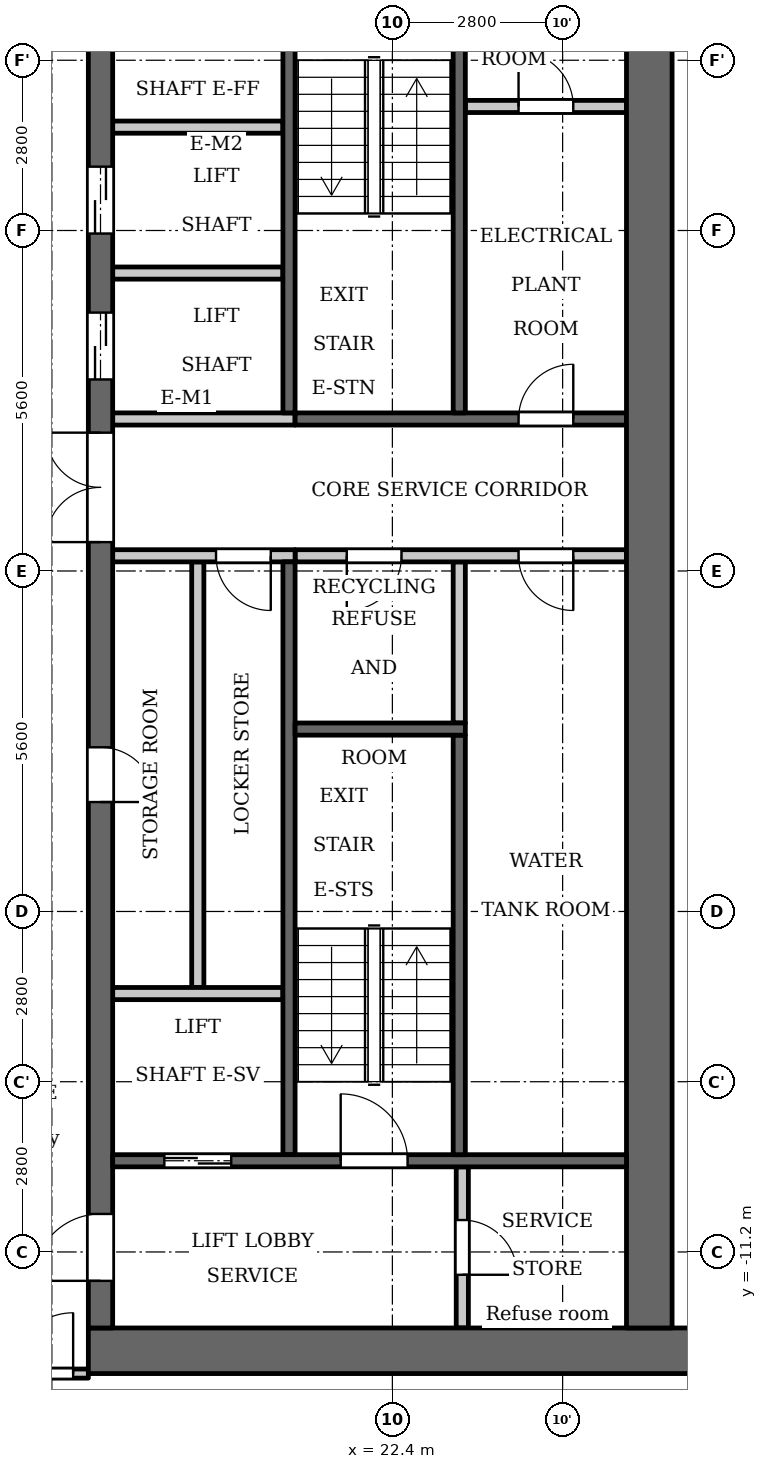
"""IFC4 building model, lengths in metres.
Left out: names, types, materials, properties, quantities, classifications, styles, units other than length and angle.
Written with IfcOpenShell. Run it as: python <this file> out.ifc"""

import sys

from ifc_helpers import new_model, si_unit, direction, frame, frame_2d, origin, place, context, subcontext, project, spatial, rectangle, extrude, element, fill, save


model = new_model("IFC4")
c1 = context("Model", 3, precision=1e-05, world=origin(), true_north=direction((0.0, 1.0)))
c2 = subcontext(c1, "Body", "Model", "MODEL_VIEW")
j1 = project(units=[si_unit("LENGTHUNIT", "METRE"), si_unit("PLANEANGLEUNIT", "RADIAN")], contexts=[c1])
p1 = place(None, origin())
s1 = spatial("IfcSite", under=j1, at=p1, CompositionType="ELEMENT")
p2 = place(p1, origin())
s2 = spatial("IfcBuilding", under=s1, at=p2, CompositionType="ELEMENT")
p3 = place(p2, frame((0.0, 0.0, 143.1)))
s3 = spatial("IfcBuildingStorey", under=s2, at=p3, CompositionType="ELEMENT", Elevation=143.1)
p4 = place(p3, frame((23.5, -2.5, 0.0), z_axis=(0.0, 0.0, 1.0), x_axis=(0.0, 1.0, 0.0)))
e1 = element("IfcWall", 1, at=p4, inside=s3, PredefinedType="PARTITIONING", context=c2, shape_type="SweptSolid", body=[
    extrude(rectangle(XDim=2.65, YDim=0.2, at=frame_2d((1.325, 0.0))), origin(), (0.0, 0.0, 1.0), 3.2),
])
p5 = place(p3, frame((20.7, 2.6, 0.0), z_axis=(0.0, 0.0, 1.0), x_axis=(0.0, 1.0, 0.0)))
e2 = element("IfcWall", 2, at=p5, inside=s3, PredefinedType="SHEAR", context=c2, shape_type="SweptSolid", body=[
    extrude(rectangle(XDim=7.0, YDim=0.2, at=frame_2d((3.5, 0.0))), origin(), (0.0, 0.0, 1.0), 3.2),
])
p6 = place(p3, frame((20.7, -9.6, 0.0), z_axis=(0.0, 0.0, 1.0), x_axis=(0.0, 1.0, 0.0)))
e3 = element("IfcWall", 3, at=p6, inside=s3, PredefinedType="SHEAR", context=c2, shape_type="SweptSolid", body=[
    extrude(rectangle(XDim=9.75, YDim=0.2, at=frame_2d((4.875, 0.0))), origin(), (0.0, 0.0, 1.0), 3.2),
])
p7 = place(p3, frame((20.8, 2.5, 0.0), z_axis=(0.0, 0.0, 1.0), x_axis=(1.0, 0.0, 0.0)))
e4 = element("IfcWall", 4, at=p7, inside=s3, PredefinedType="SHEAR", context=c2, shape_type="SweptSolid", body=[
    extrude(rectangle(XDim=5.45, YDim=0.2, at=frame_2d((2.725, 0.0))), origin(), (0.0, 0.0, 1.0), 3.2),
])
p8 = place(p7, frame((3.675, 0.0, 0.0)))
e5 = element("IfcOpeningElement", 5, at=p8, cuts=e4, PredefinedType="OPENING", context=c2, shape_type="SweptSolid", body=[
    extrude(rectangle(XDim=0.9, YDim=2.1, at=frame_2d((0.45, 1.05))), frame((0.0, 0.11, 0.0), z_axis=(0.0, -1.0, 0.0), x_axis=(1.0, 0.0, 0.0)), (0.0, 0.0, 1.0), 0.22),
])
p9 = place(p3, frame((20.8, 0.25, 0.0), z_axis=(0.0, 0.0, 1.0), x_axis=(1.0, 0.0, 0.0)))
e6 = element("IfcWall", 6, at=p9, inside=s3, PredefinedType="PARTITIONING", context=c2, shape_type="SweptSolid", body=[
    extrude(rectangle(XDim=5.45, YDim=0.2, at=frame_2d((2.725, 0.0))), origin(), (0.0, 0.0, 1.0), 3.2),
])
p10 = place(p9, frame((0.85, 0.0, 0.0)))
e7 = element("IfcOpeningElement", 7, at=p10, cuts=e6, PredefinedType="OPENING", context=c2, shape_type="SweptSolid", body=[
    extrude(rectangle(XDim=0.9, YDim=2.1, at=frame_2d((0.45, 1.05))), frame((0.0, 0.11, 0.0), z_axis=(0.0, -1.0, 0.0), x_axis=(1.0, 0.0, 0.0)), (0.0, 0.0, 1.0), 0.22),
])
p11 = place(p9, frame((3.675, 0.0, 0.0)))
e8 = element("IfcOpeningElement", 8, at=p11, cuts=e6, PredefinedType="OPENING", context=c2, shape_type="SweptSolid", body=[
    extrude(rectangle(XDim=0.9, YDim=2.1, at=frame_2d((0.45, 1.05))), frame((0.0, 0.11, 0.0), z_axis=(0.0, -1.0, 0.0), x_axis=(1.0, 0.0, 0.0)), (0.0, 0.0, 1.0), 0.22),
])
p12 = place(p3, frame((17.4, -12.825, 0.0), z_axis=(0.0, 0.0, 1.0), x_axis=(1.0, 0.0, 0.0)))
e9 = element("IfcWall", 9, at=p12, inside=s3, PredefinedType="SHEAR", context=c2, shape_type="SweptSolid", body=[
    extrude(rectangle(XDim=10.4, YDim=0.75, at=frame_2d((5.2, 0.0))), origin(), (0.0, 0.0, 1.0), 3.2),
])
p13 = place(p3, frame((19.2, -6.85, 0.0), z_axis=(0.0, 0.0, 1.0), x_axis=(0.0, 1.0, 0.0)))
e10 = element("IfcWall", 10, at=p13, inside=s3, PredefinedType="PARTITIONING", context=c2, shape_type="SweptSolid", body=[
    extrude(rectangle(XDim=7.0, YDim=0.2, at=frame_2d((3.5, 0.0))), origin(), (0.0, 0.0, 1.0), 3.2),
])
p14 = place(p3, frame((17.6, -12.45, 0.0), z_axis=(0.0, 0.0, 1.0), x_axis=(0.0, 1.0, 0.0)))
e11 = element("IfcWall", 11, at=p14, inside=s3, PredefinedType="SHEAR", context=c2, shape_type="SweptSolid", body=[
    extrude(rectangle(XDim=24.9, YDim=0.4, at=frame_2d((12.45, 0.0))), origin(), (0.0, 0.0, 1.0), 3.2),
])
p15 = place(p14, frame((8.65, 0.0, 0.0)))
e12 = element("IfcOpeningElement", 12, at=p15, cuts=e11, PredefinedType="OPENING", context=c2, shape_type="SweptSolid", body=[
    extrude(rectangle(XDim=0.9, YDim=2.1, at=frame_2d((0.45, 1.05))), frame((0.0, 0.21, 0.0), z_axis=(0.0, -1.0, 0.0), x_axis=(1.0, 0.0, 0.0)), (0.0, 0.0, 1.0), 0.42),
])
p16 = place(p14, frame((15.6, 0.0, 0.0)))
e13 = element("IfcOpeningElement", 13, at=p16, cuts=e11, PredefinedType="OPENING", context=c2, shape_type="SweptSolid", body=[
    extrude(rectangle(XDim=1.1, YDim=2.1, at=frame_2d((0.55, 1.05))), frame((0.0, 0.21, 0.0), z_axis=(0.0, -1.0, 0.0), x_axis=(1.0, 0.0, 0.0)), (0.0, 0.0, 1.0), 0.42),
])
p17 = place(p14, frame((18.0, 0.0, 0.0)))
e14 = element("IfcOpeningElement", 14, at=p17, cuts=e11, PredefinedType="OPENING", context=c2, shape_type="SweptSolid", body=[
    extrude(rectangle(XDim=1.1, YDim=2.1, at=frame_2d((0.55, 1.05))), frame((0.0, 0.21, 0.0), z_axis=(0.0, -1.0, 0.0), x_axis=(1.0, 0.0, 0.0)), (0.0, 0.0, 1.0), 0.42),
])
p18 = place(p14, frame((23.025, 0.0, 0.0)))
e15 = element("IfcOpeningElement", 15, at=p18, cuts=e11, PredefinedType="OPENING", context=c2, shape_type="SweptSolid", body=[
    extrude(rectangle(XDim=1.1, YDim=2.1, at=frame_2d((0.55, 1.05))), frame((0.0, 0.21, 0.0), z_axis=(0.0, -1.0, 0.0), x_axis=(1.0, 0.0, 0.0)), (0.0, 0.0, 1.0), 0.42),
])
p19 = place(p14, frame((0.775, 0.0, 0.0)))
e16 = element("IfcOpeningElement", 16, at=p19, cuts=e11, PredefinedType="OPENING", context=c2, shape_type="SweptSolid", body=[
    extrude(rectangle(XDim=1.1, YDim=2.1, at=frame_2d((0.55, 1.05))), frame((0.0, 0.21, 0.0), z_axis=(0.0, -1.0, 0.0), x_axis=(1.0, 0.0, 0.0)), (0.0, 0.0, 1.0), 0.42),
])
p20 = place(p14, frame((12.925, 0.0, 0.0)))
e17 = element("IfcOpeningElement", 17, at=p20, cuts=e11, PredefinedType="OPENING", context=c2, shape_type="SweptSolid", body=[
    extrude(rectangle(XDim=1.8, YDim=2.1, at=frame_2d((0.9, 1.05))), frame((0.0, 0.21, 0.0), z_axis=(0.0, -1.0, 0.0), x_axis=(1.0, 0.0, 0.0)), (0.0, 0.0, 1.0), 0.42),
])
p21 = place(p3, frame((26.625, -12.45, 0.0), z_axis=(0.0, 0.0, 1.0), x_axis=(0.0, 1.0, 0.0)))
e18 = element("IfcWall", 18, at=p21, inside=s3, PredefinedType="SHEAR", context=c2, shape_type="SweptSolid", body=[
    extrude(rectangle(XDim=24.9, YDim=0.75, at=frame_2d((12.45, 0.0))), origin(), (0.0, 0.0, 1.0), 3.2),
])
p22 = place(p3, frame((23.55, -12.45, 0.0), z_axis=(0.0, 0.0, 1.0), x_axis=(0.0, 1.0, 0.0)))
e19 = element("IfcWall", 19, at=p22, inside=s3, PredefinedType="PARTITIONING", context=c2, shape_type="SweptSolid", body=[
    extrude(rectangle(XDim=2.65, YDim=0.2, at=frame_2d((1.325, 0.0))), origin(), (0.0, 0.0, 1.0), 3.2),
])
p23 = place(p22, frame((0.875, 0.0, 0.0)))
e20 = element("IfcOpeningElement", 20, at=p23, cuts=e19, PredefinedType="OPENING", context=c2, shape_type="SweptSolid", body=[
    extrude(rectangle(XDim=0.9, YDim=2.1, at=frame_2d((0.45, 1.05))), frame((0.0, 0.11, 0.0), z_axis=(0.0, -1.0, 0.0), x_axis=(1.0, 0.0, 0.0)), (0.0, 0.0, 1.0), 0.22),
])
p24 = place(p3, frame((23.6, 7.64, 0.0), z_axis=(0.0, 0.0, 1.0), x_axis=(1.0, 0.0, 0.0)))
e21 = element("IfcWall", 21, at=p24, inside=s3, PredefinedType="PARTITIONING", context=c2, shape_type="SweptSolid", body=[
    extrude(rectangle(XDim=2.65, YDim=0.2, at=frame_2d((1.325, 0.0))), origin(), (0.0, 0.0, 1.0), 3.2),
])
p25 = place(p24, frame((0.875, 0.0, 0.0)))
e22 = element("IfcOpeningElement", 22, at=p25, cuts=e21, PredefinedType="OPENING", context=c2, shape_type="SweptSolid", body=[
    extrude(rectangle(XDim=0.9, YDim=2.1, at=frame_2d((0.45, 1.05))), frame((0.0, 0.11, 0.0), z_axis=(0.0, -1.0, 0.0), x_axis=(1.0, 0.0, 0.0)), (0.0, 0.0, 1.0), 0.22),
])
p26 = place(p3, frame((17.8, -9.7, 0.0), z_axis=(0.0, 0.0, 1.0), x_axis=(1.0, 0.0, 0.0)))
e23 = element("IfcWall", 23, at=p26, inside=s3, PredefinedType="SHEAR", context=c2, shape_type="SweptSolid", body=[
    extrude(rectangle(XDim=8.45, YDim=0.2, at=frame_2d((4.225, 0.0))), origin(), (0.0, 0.0, 1.0), 3.2),
])
p27 = place(p26, frame((0.85, 0.0, 0.0)))
e24 = element("IfcOpeningElement", 24, at=p27, cuts=e23, PredefinedType="OPENING", context=c2, shape_type="SweptSolid", body=[
    extrude(rectangle(XDim=1.1, YDim=2.1, at=frame_2d((0.55, 1.05))), frame((0.0, 0.11, 0.0), z_axis=(0.0, -1.0, 0.0), x_axis=(1.0, 0.0, 0.0)), (0.0, 0.0, 1.0), 0.22),
])
p28 = place(p26, frame((3.75, 0.0, 0.0)))
e25 = element("IfcOpeningElement", 25, at=p28, cuts=e23, PredefinedType="OPENING", context=c2, shape_type="SweptSolid", body=[
    extrude(rectangle(XDim=1.1, YDim=2.1, at=frame_2d((0.55, 1.05))), frame((0.0, 0.11, 0.0), z_axis=(0.0, -1.0, 0.0), x_axis=(1.0, 0.0, 0.0)), (0.0, 0.0, 1.0), 0.22),
])
p29 = place(p3, frame((17.8, -6.95, 0.0), z_axis=(0.0, 0.0, 1.0), x_axis=(1.0, 0.0, 0.0)))
e26 = element("IfcWall", 26, at=p29, inside=s3, PredefinedType="PARTITIONING", context=c2, shape_type="SweptSolid", body=[
    extrude(rectangle(XDim=2.8, YDim=0.2, at=frame_2d((1.4, 0.0))), origin(), (0.0, 0.0, 1.0), 3.2),
])
p30 = place(p3, frame((17.8, 0.25, 0.0), z_axis=(0.0, 0.0, 1.0), x_axis=(1.0, 0.0, 0.0)))
e27 = element("IfcWall", 27, at=p30, inside=s3, PredefinedType="PARTITIONING", context=c2, shape_type="SweptSolid", body=[
    extrude(rectangle(XDim=3.0, YDim=0.2, at=frame_2d((1.5, 0.0))), origin(), (0.0, 0.0, 1.0), 3.2),
])
p31 = place(p30, frame((1.7, 0.0, 0.0)))
e28 = element("IfcOpeningElement", 28, at=p31, cuts=e27, PredefinedType="OPENING", context=c2, shape_type="SweptSolid", body=[
    extrude(rectangle(XDim=0.9, YDim=2.1, at=frame_2d((0.45, 1.05))), frame((0.0, 0.11, 0.0), z_axis=(0.0, -1.0, 0.0), x_axis=(1.0, 0.0, 0.0)), (0.0, 0.0, 1.0), 0.22),
])
p32 = place(p3, frame((17.8, 2.5, 0.0), z_axis=(0.0, 0.0, 1.0), x_axis=(1.0, 0.0, 0.0)))
e29 = element("IfcWall", 29, at=p32, inside=s3, PredefinedType="PARTITIONING", context=c2, shape_type="SweptSolid", body=[
    extrude(rectangle(XDim=3.0, YDim=0.2, at=frame_2d((1.5, 0.0))), origin(), (0.0, 0.0, 1.0), 3.2),
])
for number, where, z_axis, x_axis in (
    (30, (17.8, 4.9, 0.0), (0.0, 0.0, 1.0), (1.0, 0.0, 0.0)),
    (31, (17.8, 7.3, 0.0), (0.0, 0.0, 1.0), (1.0, 0.0, 0.0)),
):
    element("IfcWall", number, at=place(p3, frame(where, z_axis=z_axis, x_axis=x_axis)), inside=s3, PredefinedType="PARTITIONING", context=c2, shape_type="SweptSolid", body=[
        extrude(rectangle(XDim=2.8, YDim=0.2, at=frame_2d((1.4, 0.0))), origin(), (0.0, 0.0, 1.0), 3.2),
    ])
p33 = place(p3, frame((23.5, 2.6, 0.0), z_axis=(0.0, 0.0, 1.0), x_axis=(0.0, 1.0, 0.0)))
e32 = element("IfcWall", 32, at=p33, inside=s3, PredefinedType="SHEAR", context=c2, shape_type="SweptSolid", body=[
    extrude(rectangle(XDim=7.0, YDim=0.2, at=frame_2d((3.5, 0.0))), origin(), (0.0, 0.0, 1.0), 3.2),
])
p34 = place(p3, frame((23.5, -9.6, 0.0), z_axis=(0.0, 0.0, 1.0), x_axis=(0.0, 1.0, 0.0)))
e33 = element("IfcWall", 33, at=p34, inside=s3, PredefinedType="SHEAR", context=c2, shape_type="SweptSolid", body=[
    extrude(rectangle(XDim=6.9, YDim=0.2, at=frame_2d((3.45, 0.0))), origin(), (0.0, 0.0, 1.0), 3.2),
])
p35 = place(p3, frame((20.8, -2.6, 0.0), z_axis=(0.0, 0.0, 1.0), x_axis=(1.0, 0.0, 0.0)))
e34 = element("IfcWall", 34, at=p35, inside=s3, PredefinedType="SHEAR", context=c2, shape_type="SweptSolid", body=[
    extrude(rectangle(XDim=2.8, YDim=0.2, at=frame_2d((1.4, 0.0))), origin(), (0.0, 0.0, 1.0), 3.2),
])
p36 = place(p3, frame((-17.4, -13.2, 0.0), z_axis=(0.0, 0.0, 1.0), x_axis=(1.0, 0.0, 0.0)))
e35 = element("IfcWall", 35, at=p36, inside=s3, PredefinedType="PARTITIONING", context=c2, shape_type="SweptSolid", body=[
    extrude(rectangle(XDim=34.8, YDim=0.15, at=frame_2d((17.4, 0.0))), origin(), (0.0, 0.0, 1.0), 3.2),
])
p37 = place(p36, frame((0.15, 0.0, 0.0)))
e36 = element("IfcOpeningElement", 36, at=p37, cuts=e35, PredefinedType="OPENING", context=c2, shape_type="SweptSolid", body=[
    extrude(rectangle(XDim=1.0, YDim=2.1, at=frame_2d((0.5, 1.05))), frame((0.0, 0.085, 0.0), z_axis=(0.0, -1.0, 0.0), x_axis=(1.0, 0.0, 0.0)), (0.0, 0.0, 1.0), 0.17),
])
p38 = place(p36, frame((33.55, 0.0, 0.0)))
e37 = element("IfcOpeningElement", 37, at=p38, cuts=e35, PredefinedType="OPENING", context=c2, shape_type="SweptSolid", body=[
    extrude(rectangle(XDim=1.0, YDim=2.1, at=frame_2d((0.5, 1.05))), frame((0.0, 0.085, 0.0), z_axis=(0.0, -1.0, 0.0), x_axis=(1.0, 0.0, 0.0)), (0.0, 0.0, 1.0), 0.17),
])
p39 = place(p36, frame((6.85, 0.0, 0.0)))
e38 = element("IfcOpeningElement", 38, at=p39, cuts=e35, PredefinedType="OPENING", context=c2, shape_type="SweptSolid", body=[
    extrude(rectangle(XDim=1.0, YDim=2.1, at=frame_2d((0.5, 1.05))), frame((0.0, 0.085, 0.0), z_axis=(0.0, -1.0, 0.0), x_axis=(1.0, 0.0, 0.0)), (0.0, 0.0, 1.0), 0.17),
])
p40 = place(p36, frame((12.45, 0.0, 0.0)))
e39 = element("IfcOpeningElement", 39, at=p40, cuts=e35, PredefinedType="OPENING", context=c2, shape_type="SweptSolid", body=[
    extrude(rectangle(XDim=1.0, YDim=2.1, at=frame_2d((0.5, 1.05))), frame((0.0, 0.085, 0.0), z_axis=(0.0, -1.0, 0.0), x_axis=(1.0, 0.0, 0.0)), (0.0, 0.0, 1.0), 0.17),
])
p41 = place(p36, frame((21.3, 0.0, 0.0)))
e40 = element("IfcOpeningElement", 40, at=p41, cuts=e35, PredefinedType="OPENING", context=c2, shape_type="SweptSolid", body=[
    extrude(rectangle(XDim=1.0, YDim=2.1, at=frame_2d((0.5, 1.05))), frame((0.0, 0.085, 0.0), z_axis=(0.0, -1.0, 0.0), x_axis=(1.0, 0.0, 0.0)), (0.0, 0.0, 1.0), 0.17),
])
p42 = place(p36, frame((26.9, 0.0, 0.0)))
e41 = element("IfcOpeningElement", 41, at=p42, cuts=e35, PredefinedType="OPENING", context=c2, shape_type="SweptSolid", body=[
    extrude(rectangle(XDim=1.0, YDim=2.1, at=frame_2d((0.5, 1.05))), frame((0.0, 0.085, 0.0), z_axis=(0.0, -1.0, 0.0), x_axis=(1.0, 0.0, 0.0)), (0.0, 0.0, 1.0), 0.17),
])
p43 = place(p27, origin())
e42 = element("IfcDoor", 42, at=p43, inside=s3, OperationType="DOUBLE_DOOR_SLIDING", PredefinedType="DOOR", context=c2, shape_type="SweptSolid", body=[
    extrude(rectangle(XDim=1.1, YDim=2.1, at=frame_2d((0.55, 1.05))), frame((0.0, 0.025, 0.0), z_axis=(0.0, -1.0, 0.0), x_axis=(1.0, 0.0, 0.0)), (0.0, 0.0, 1.0), 0.05),
])
fill(e24, e42)
p44 = place(p15, origin())
e43 = element("IfcDoor", 43, at=p44, inside=s3, OperationType="SINGLE_SWING_LEFT", PredefinedType="DOOR", context=c2, shape_type="SweptSolid", body=[
    extrude(rectangle(XDim=0.9, YDim=2.1, at=frame_2d((0.45, 1.05))), frame((0.0, 0.025, 0.0), z_axis=(0.0, -1.0, 0.0), x_axis=(1.0, 0.0, 0.0)), (0.0, 0.0, 1.0), 0.05),
])
fill(e12, e43)
p45 = place(p31, origin())
e44 = element("IfcDoor", 44, at=p45, inside=s3, OperationType="SINGLE_SWING_RIGHT", PredefinedType="DOOR", context=c2, shape_type="SweptSolid", body=[
    extrude(rectangle(XDim=0.9, YDim=2.1, at=frame_2d((0.45, 1.05))), frame((0.0, 0.025, 0.0), z_axis=(0.0, -1.0, 0.0), x_axis=(1.0, 0.0, 0.0)), (0.0, 0.0, 1.0), 0.05),
])
fill(e28, e44)
p46 = place(p16, origin())
e45 = element("IfcDoor", 45, at=p46, inside=s3, OperationType="DOUBLE_DOOR_SLIDING", PredefinedType="DOOR", context=c2, shape_type="SweptSolid", body=[
    extrude(rectangle(XDim=1.1, YDim=2.1, at=frame_2d((0.55, 1.05))), frame((0.0, 0.025, 0.0), z_axis=(0.0, -1.0, 0.0), x_axis=(1.0, 0.0, 0.0)), (0.0, 0.0, 1.0), 0.05),
])
fill(e13, e45)
p47 = place(p17, origin())
e46 = element("IfcDoor", 46, at=p47, inside=s3, OperationType="DOUBLE_DOOR_SLIDING", PredefinedType="DOOR", context=c2, shape_type="SweptSolid", body=[
    extrude(rectangle(XDim=1.1, YDim=2.1, at=frame_2d((0.55, 1.05))), frame((0.0, 0.025, 0.0), z_axis=(0.0, -1.0, 0.0), x_axis=(1.0, 0.0, 0.0)), (0.0, 0.0, 1.0), 0.05),
])
fill(e14, e46)
p48 = place(p19, origin())
e47 = element("IfcDoor", 47, at=p48, inside=s3, OperationType="SINGLE_SWING_RIGHT", PredefinedType="DOOR", context=c2, shape_type="SweptSolid", body=[
    extrude(rectangle(XDim=1.1, YDim=2.1, at=frame_2d((0.55, 1.05))), frame((0.0, 0.025, 0.0), z_axis=(0.0, -1.0, 0.0), x_axis=(1.0, 0.0, 0.0)), (0.0, 0.0, 1.0), 0.05),
])
fill(e16, e47)
p49 = place(p23, origin())
e48 = element("IfcDoor", 48, at=p49, inside=s3, OperationType="SINGLE_SWING_LEFT", PredefinedType="DOOR", context=c2, shape_type="SweptSolid", body=[
    extrude(rectangle(XDim=0.9, YDim=2.1, at=frame_2d((0.45, 1.05))), frame((0.0, 0.025, 0.0), z_axis=(0.0, -1.0, 0.0), x_axis=(1.0, 0.0, 0.0)), (0.0, 0.0, 1.0), 0.05),
])
fill(e20, e48)
p50 = place(p28, origin())
e49 = element("IfcDoor", 49, at=p50, inside=s3, OperationType="SINGLE_SWING_RIGHT", PredefinedType="DOOR", context=c2, shape_type="SweptSolid", body=[
    extrude(rectangle(XDim=1.1, YDim=2.1, at=frame_2d((0.55, 1.05))), frame((0.0, 0.025, 0.0), z_axis=(0.0, -1.0, 0.0), x_axis=(1.0, 0.0, 0.0)), (0.0, 0.0, 1.0), 0.05),
])
fill(e25, e49)
p51 = place(p20, origin())
e50 = element("IfcDoor", 50, at=p51, inside=s3, OperationType="DOUBLE_DOOR_SINGLE_SWING", PredefinedType="DOOR", context=c2, shape_type="SweptSolid", body=[
    extrude(rectangle(XDim=1.8, YDim=2.1, at=frame_2d((0.9, 1.05))), frame((0.0, 0.025, 0.0), z_axis=(0.0, -1.0, 0.0), x_axis=(1.0, 0.0, 0.0)), (0.0, 0.0, 1.0), 0.05),
])
fill(e17, e50)
p52 = place(p10, origin())
e51 = element("IfcDoor", 51, at=p52, inside=s3, OperationType="SINGLE_SWING_LEFT", PredefinedType="DOOR", context=c2, shape_type="SweptSolid", body=[
    extrude(rectangle(XDim=0.9, YDim=2.1, at=frame_2d((0.45, 1.05))), frame((0.0, 0.025, 0.0), z_axis=(0.0, -1.0, 0.0), x_axis=(1.0, 0.0, 0.0)), (0.0, 0.0, 1.0), 0.05),
])
fill(e7, e51)
p53 = place(p11, origin())
e52 = element("IfcDoor", 52, at=p53, inside=s3, OperationType="SINGLE_SWING_RIGHT", PredefinedType="DOOR", context=c2, shape_type="SweptSolid", body=[
    extrude(rectangle(XDim=0.9, YDim=2.1, at=frame_2d((0.45, 1.05))), frame((0.0, 0.025, 0.0), z_axis=(0.0, -1.0, 0.0), x_axis=(1.0, 0.0, 0.0)), (0.0, 0.0, 1.0), 0.05),
])
fill(e8, e52)
p54 = place(p25, origin())
e53 = element("IfcDoor", 53, at=p54, inside=s3, OperationType="SINGLE_SWING_RIGHT", PredefinedType="DOOR", context=c2, shape_type="SweptSolid", body=[
    extrude(rectangle(XDim=0.9, YDim=2.1, at=frame_2d((0.45, 1.05))), frame((0.0, 0.025, 0.0), z_axis=(0.0, -1.0, 0.0), x_axis=(1.0, 0.0, 0.0)), (0.0, 0.0, 1.0), 0.05),
])
fill(e22, e53)
p55 = place(p8, origin())
e54 = element("IfcDoor", 54, at=p55, inside=s3, OperationType="SINGLE_SWING_LEFT", PredefinedType="DOOR", context=c2, shape_type="SweptSolid", body=[
    extrude(rectangle(XDim=0.9, YDim=2.1, at=frame_2d((0.45, 1.05))), frame((0.0, 0.025, 0.0), z_axis=(0.0, -1.0, 0.0), x_axis=(1.0, 0.0, 0.0)), (0.0, 0.0, 1.0), 0.05),
])
fill(e5, e54)
p56 = place(p38, origin())
e55 = element("IfcDoor", 55, at=p56, inside=s3, OperationType="SINGLE_SWING_LEFT", PredefinedType="DOOR", context=c2, shape_type="SweptSolid", body=[
    extrude(rectangle(XDim=1.0, YDim=2.1, at=frame_2d((0.5, 1.05))), frame((0.0, 0.025, 0.0), z_axis=(0.0, -1.0, 0.0), x_axis=(1.0, 0.0, 0.0)), (0.0, 0.0, 1.0), 0.05),
])
fill(e37, e55)
save(model, sys.argv[1])
